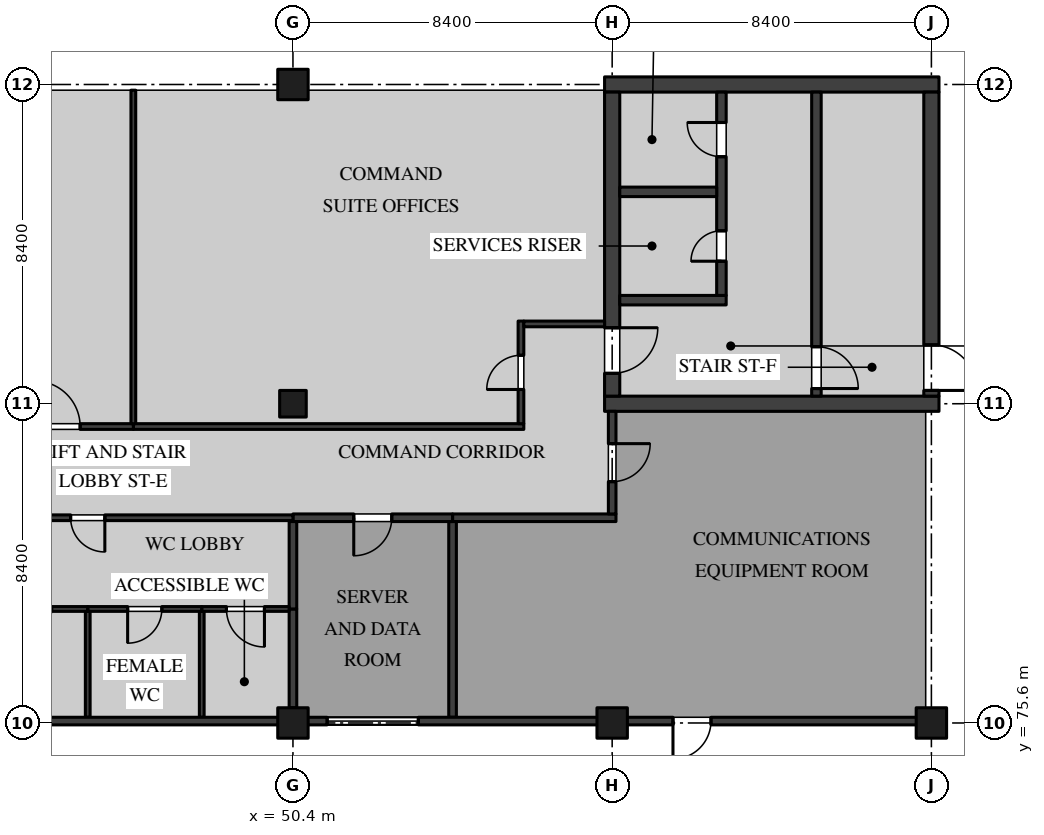
"""IFC4 building model, lengths in metres.
Left out: names, types, materials, properties, quantities, classifications, styles, units other than length and angle.
Written with IfcOpenShell. Run it as: python <this file> out.ifc"""

import sys

from ifc_helpers import new_model, si_unit, direction, frame, frame_2d, origin, origin_2d, place, context, subcontext, project, spatial, rectangle, extrude, element, fill, save


model = new_model("IFC4")
c1 = context("Model", 3, precision=1e-05, world=origin(), true_north=direction((0.0, 1.0)))
c2 = subcontext(c1, "Body", "Model", "MODEL_VIEW")
j1 = project(units=[si_unit("LENGTHUNIT", "METRE"), si_unit("PLANEANGLEUNIT", "RADIAN")], contexts=[c1])
p1 = place(None, origin())
s1 = spatial("IfcSite", under=j1, at=p1, CompositionType="ELEMENT")
p2 = place(p1, origin())
s2 = spatial("IfcBuilding", under=s1, at=p2, CompositionType="ELEMENT")
p3 = place(p2, origin())
s3 = spatial("IfcBuildingStorey", under=s2, at=p3, CompositionType="ELEMENT", Elevation=0.0)
p4 = place(p3, frame((50.4, 75.6, 0.0), z_axis=(0.0, 0.0, 1.0), x_axis=(1.0, 0.0, 0.0)))
e1 = element("IfcColumn", 1, at=p4, inside=s3, PredefinedType="COLUMN", context=c2, shape_type="SweptSolid", body=[
    extrude(rectangle(XDim=0.8, YDim=0.8, at=origin_2d()), origin(), (0.0, 0.0, 1.0), 5.05),
])
p5 = place(p3, frame((50.4, 84.0, 0.0), z_axis=(0.0, 0.0, 1.0), x_axis=(1.0, 0.0, 0.0)))
e2 = element("IfcColumn", 2, at=p5, inside=s3, PredefinedType="COLUMN", context=c2, shape_type="SweptSolid", body=[
    extrude(rectangle(XDim=0.7, YDim=0.7, at=origin_2d()), origin(), (0.0, 0.0, 1.0), 5.05),
])
for number, where, z_axis, x_axis in (
    (3, (50.4, 92.4, 0.0), (0.0, 0.0, 1.0), (1.0, 0.0, 0.0)),
    (4, (58.8, 75.6, 0.0), (0.0, 0.0, 1.0), (1.0, 0.0, 0.0)),
    (5, (67.2, 75.6, 0.0), (0.0, 0.0, 1.0), (1.0, 0.0, 0.0)),
):
    element("IfcColumn", number, at=place(p3, frame(where, z_axis=z_axis, x_axis=x_axis)), inside=s3, PredefinedType="COLUMN", context=c2, shape_type="SweptSolid", body=[
        extrude(rectangle(XDim=0.8, YDim=0.8, at=origin_2d()), origin(), (0.0, 0.0, 1.0), 5.05),
    ])
for number, where, z_axis, x_axis in (
    (6, (58.6, 84.0, 0.0), (0.0, 0.0, 1.0), (1.0, 0.0, 0.0)),
    (7, (58.6, 92.4, 0.0), (0.0, 0.0, 1.0), (1.0, 0.0, 0.0)),
):
    element("IfcWall", number, at=place(p3, frame(where, z_axis=z_axis, x_axis=x_axis)), inside=s3, PredefinedType="SHEAR", context=c2, shape_type="SweptSolid", body=[
        extrude(rectangle(XDim=8.8, YDim=0.4, at=frame_2d((4.4, 0.0))), origin(), (0.0, 0.0, 1.0), 5.05),
    ])
p6 = place(p3, frame((58.8, 84.2, 0.0), z_axis=(0.0, 0.0, 1.0), x_axis=(0.0, 1.0, 0.0)))
e8 = element("IfcWall", 8, at=p6, inside=s3, PredefinedType="SHEAR", context=c2, shape_type="SweptSolid", body=[
    extrude(rectangle(XDim=8.0, YDim=0.4, at=frame_2d((4.0, 0.0))), origin(), (0.0, 0.0, 1.0), 5.05),
])
p7 = place(p6, frame((0.6, 0.0, 0.0)))
e9 = element("IfcOpeningElement", 9, at=p7, cuts=e8, PredefinedType="OPENING", context=c2, shape_type="SweptSolid", body=[
    extrude(rectangle(XDim=1.2, YDim=2.1, at=frame_2d((0.6, 1.05))), frame((0.0, 0.21, 0.0), z_axis=(0.0, -1.0, 0.0), x_axis=(1.0, 0.0, 0.0)), (0.0, 0.0, 1.0), 0.42),
])
p8 = place(p3, frame((67.2, 84.2, 0.0), z_axis=(0.0, 0.0, 1.0), x_axis=(0.0, 1.0, 0.0)))
e10 = element("IfcWall", 10, at=p8, inside=s3, PredefinedType="SHEAR", context=c2, shape_type="SweptSolid", body=[
    extrude(rectangle(XDim=8.0, YDim=0.4, at=frame_2d((4.0, 0.0))), origin(), (0.0, 0.0, 1.0), 5.05),
])
p9 = place(p8, frame((0.15, 0.0, 0.0)))
e11 = element("IfcOpeningElement", 11, at=p9, cuts=e10, PredefinedType="OPENING", context=c2, shape_type="SweptSolid", body=[
    extrude(rectangle(XDim=1.2, YDim=2.1, at=frame_2d((0.6, 1.05))), frame((0.0, 0.21, 0.0), z_axis=(0.0, -1.0, 0.0), x_axis=(1.0, 0.0, 0.0)), (0.0, 0.0, 1.0), 0.42),
])
p10 = place(p3, frame((64.175, 84.2, 0.0), z_axis=(0.0, 0.0, 1.0), x_axis=(0.0, 1.0, 0.0)))
e12 = element("IfcWall", 12, at=p10, inside=s3, PredefinedType="SOLIDWALL", context=c2, shape_type="SweptSolid", body=[
    extrude(rectangle(XDim=8.0, YDim=0.25, at=frame_2d((4.0, 0.0))), origin(), (0.0, 0.0, 1.0), 5.05),
])
p11 = place(p10, frame((0.2, 0.0, 0.0)))
e13 = element("IfcOpeningElement", 13, at=p11, cuts=e12, PredefinedType="OPENING", context=c2, shape_type="SweptSolid", body=[
    extrude(rectangle(XDim=1.1, YDim=2.1, at=frame_2d((0.55, 1.05))), frame((0.0, 0.135, 0.0), z_axis=(0.0, -1.0, 0.0), x_axis=(1.0, 0.0, 0.0)), (0.0, 0.0, 1.0), 0.27),
])
p12 = place(p3, frame((61.8, 86.725, 0.0), z_axis=(0.0, 0.0, 1.0), x_axis=(-1.0, 0.0, 0.0)))
e14 = element("IfcWall", 14, at=p12, inside=s3, PredefinedType="SOLIDWALL", context=c2, shape_type="SweptSolid", body=[
    extrude(rectangle(XDim=2.8, YDim=0.25, at=frame_2d((1.4, 0.0))), origin(), (0.0, 0.0, 1.0), 5.05),
])
p13 = place(p3, frame((61.675, 86.85, 0.0), z_axis=(0.0, 0.0, 1.0), x_axis=(0.0, 1.0, 0.0)))
e15 = element("IfcWall", 15, at=p13, inside=s3, PredefinedType="SOLIDWALL", context=c2, shape_type="SweptSolid", body=[
    extrude(rectangle(XDim=5.35, YDim=0.25, at=frame_2d((2.675, 0.0))), origin(), (0.0, 0.0, 1.0), 5.05),
])
p14 = place(p13, frame((3.65, 0.0, 0.0)))
e16 = element("IfcOpeningElement", 16, at=p14, cuts=e15, PredefinedType="OPENING", context=c2, shape_type="SweptSolid", body=[
    extrude(rectangle(XDim=0.9, YDim=2.1, at=frame_2d((0.45, 1.05))), frame((0.0, 0.135, 0.0), z_axis=(0.0, -1.0, 0.0), x_axis=(1.0, 0.0, 0.0)), (0.0, 0.0, 1.0), 0.27),
])
p15 = place(p13, frame((0.9, 0.0, 0.0)))
e17 = element("IfcOpeningElement", 17, at=p15, cuts=e15, PredefinedType="OPENING", context=c2, shape_type="SweptSolid", body=[
    extrude(rectangle(XDim=0.8, YDim=2.1, at=frame_2d((0.4, 1.05))), frame((0.0, 0.135, 0.0), z_axis=(0.0, -1.0, 0.0), x_axis=(1.0, 0.0, 0.0)), (0.0, 0.0, 1.0), 0.27),
])
p16 = place(p3, frame((61.55, 89.575, 0.0), z_axis=(0.0, 0.0, 1.0), x_axis=(-1.0, 0.0, 0.0)))
e18 = element("IfcWall", 18, at=p16, inside=s3, PredefinedType="SOLIDWALL", context=c2, shape_type="SweptSolid", body=[
    extrude(rectangle(XDim=2.55, YDim=0.25, at=frame_2d((1.275, 0.0))), origin(), (0.0, 0.0, 1.0), 5.05),
])
p17 = place(p3, frame((54.6, 81.0, 0.0), z_axis=(0.0, 0.0, 1.0), x_axis=(1.0, 0.0, 0.0)))
e19 = element("IfcWall", 19, at=p17, inside=s3, PredefinedType="PARTITIONING", context=c2, shape_type="SweptSolid", body=[
    extrude(rectangle(XDim=4.3, YDim=0.2, at=frame_2d((2.15, 0.0))), origin(), (0.0, 0.0, 1.0), 5.05),
])
p18 = place(p3, frame((58.8, 81.1, 0.0), z_axis=(0.0, 0.0, 1.0), x_axis=(0.0, 1.0, 0.0)))
e20 = element("IfcWall", 20, at=p18, inside=s3, PredefinedType="PARTITIONING", context=c2, shape_type="SweptSolid", body=[
    extrude(rectangle(XDim=2.7, YDim=0.2, at=frame_2d((1.35, 0.0))), origin(), (0.0, 0.0, 1.0), 5.05),
])
p19 = place(p18, frame((0.85, 0.0, 0.0)))
e21 = element("IfcOpeningElement", 21, at=p19, cuts=e20, PredefinedType="OPENING", context=c2, shape_type="SweptSolid", body=[
    extrude(rectangle(XDim=1.0, YDim=2.1, at=frame_2d((0.5, 1.05))), frame((0.0, 0.11, 0.0), z_axis=(0.0, -1.0, 0.0), x_axis=(1.0, 0.0, 0.0)), (0.0, 0.0, 1.0), 0.22),
])
p20 = place(p3, frame((54.6, 75.75, 0.0), z_axis=(0.0, 0.0, 1.0), x_axis=(0.0, 1.0, 0.0)))
e22 = element("IfcWall", 22, at=p20, inside=s3, PredefinedType="PARTITIONING", context=c2, shape_type="SweptSolid", body=[
    extrude(rectangle(XDim=5.15, YDim=0.2, at=frame_2d((2.575, 0.0))), origin(), (0.0, 0.0, 1.0), 5.05),
])
p21 = place(p3, frame((46.2, 83.4, 0.0), z_axis=(0.0, 0.0, 1.0), x_axis=(1.0, 0.0, 0.0)))
e23 = element("IfcWall", 23, at=p21, inside=s3, PredefinedType="PARTITIONING", context=c2, shape_type="SweptSolid", body=[
    extrude(rectangle(XDim=10.275, YDim=0.15, at=frame_2d((5.138, 0.0))), origin(), (0.0, 0.0, 1.0), 5.05),
])
p22 = place(p3, frame((56.4, 83.475, 0.0), z_axis=(0.0, 0.0, 1.0), x_axis=(0.0, 1.0, 0.0)))
e24 = element("IfcWall", 24, at=p22, inside=s3, PredefinedType="PARTITIONING", context=c2, shape_type="SweptSolid", body=[
    extrude(rectangle(XDim=2.7, YDim=0.15, at=frame_2d((1.35, 0.0))), origin(), (0.0, 0.0, 1.0), 5.05),
])
p23 = place(p22, frame((0.9, 0.0, 0.0)))
e25 = element("IfcOpeningElement", 25, at=p23, cuts=e24, PredefinedType="OPENING", context=c2, shape_type="SweptSolid", body=[
    extrude(rectangle(XDim=0.9, YDim=2.1, at=frame_2d((0.45, 1.05))), frame((0.0, 0.085, 0.0), z_axis=(0.0, -1.0, 0.0), x_axis=(1.0, 0.0, 0.0)), (0.0, 0.0, 1.0), 0.17),
])
p24 = place(p3, frame((56.475, 86.1, 0.0), z_axis=(0.0, 0.0, 1.0), x_axis=(1.0, 0.0, 0.0)))
e26 = element("IfcWall", 26, at=p24, inside=s3, PredefinedType="PARTITIONING", context=c2, shape_type="SweptSolid", body=[
    extrude(rectangle(XDim=2.125, YDim=0.15, at=frame_2d((1.062, 0.0))), origin(), (0.0, 0.0, 1.0), 5.05),
])
p25 = place(p3, frame((42.2, 83.4, 0.0), z_axis=(0.0, 0.0, 1.0), x_axis=(1.0, 0.0, 0.0)))
e27 = element("IfcWall", 27, at=p25, inside=s3, PredefinedType="PARTITIONING", context=c2, shape_type="SweptSolid", body=[
    extrude(rectangle(XDim=4.0, YDim=0.15, at=frame_2d((2.0, 0.0))), origin(), (0.0, 0.0, 1.0), 5.05),
])
p26 = place(p25, frame((1.4, 0.0, 0.0)))
e28 = element("IfcOpeningElement", 28, at=p26, cuts=e27, PredefinedType="OPENING", context=c2, shape_type="SweptSolid", body=[
    extrude(rectangle(XDim=1.2, YDim=2.4, at=frame_2d((0.6, 1.2))), frame((0.0, 0.085, 0.0), z_axis=(0.0, -1.0, 0.0), x_axis=(1.0, 0.0, 0.0)), (0.0, 0.0, 1.0), 0.17),
])
p27 = place(p3, frame((50.4, 81.0, 0.0), z_axis=(0.0, 0.0, 1.0), x_axis=(1.0, 0.0, 0.0)))
e29 = element("IfcWall", 29, at=p27, inside=s3, PredefinedType="PARTITIONING", context=c2, shape_type="SweptSolid", body=[
    extrude(rectangle(XDim=4.2, YDim=0.2, at=frame_2d((2.1, 0.0))), origin(), (0.0, 0.0, 1.0), 5.05),
])
p28 = place(p27, frame((1.6, 0.0, 0.0)))
e30 = element("IfcOpeningElement", 30, at=p28, cuts=e29, PredefinedType="OPENING", context=c2, shape_type="SweptSolid", body=[
    extrude(rectangle(XDim=1.0, YDim=2.1, at=frame_2d((0.5, 1.05))), frame((0.0, 0.11, 0.0), z_axis=(0.0, -1.0, 0.0), x_axis=(1.0, 0.0, 0.0)), (0.0, 0.0, 1.0), 0.22),
])
p29 = place(p3, frame((42.2, 81.0, 0.0), z_axis=(0.0, 0.0, 1.0), x_axis=(1.0, 0.0, 0.0)))
e31 = element("IfcWall", 31, at=p29, inside=s3, PredefinedType="PARTITIONING", context=c2, shape_type="SweptSolid", body=[
    extrude(rectangle(XDim=8.2, YDim=0.15, at=frame_2d((4.1, 0.0))), origin(), (0.0, 0.0, 1.0), 5.05),
])
p30 = place(p29, frame((2.35, 0.0, 0.0)))
e32 = element("IfcOpeningElement", 32, at=p30, cuts=e31, PredefinedType="OPENING", context=c2, shape_type="SweptSolid", body=[
    extrude(rectangle(XDim=0.9, YDim=2.1, at=frame_2d((0.45, 1.05))), frame((0.0, 0.085, 0.0), z_axis=(0.0, -1.0, 0.0), x_axis=(1.0, 0.0, 0.0)), (0.0, 0.0, 1.0), 0.17),
])
p31 = place(p3, frame((46.2, 83.475, 0.0), z_axis=(0.0, 0.0, 1.0), x_axis=(0.0, 1.0, 0.0)))
e33 = element("IfcWall", 33, at=p31, inside=s3, PredefinedType="PARTITIONING", context=c2, shape_type="SweptSolid", body=[
    extrude(rectangle(XDim=8.775, YDim=0.125, at=frame_2d((4.387, 0.0))), origin(), (0.0, 0.0, 1.0), 5.05),
])
p32 = place(p3, frame((50.4, 76.0, 0.0), z_axis=(0.0, 0.0, 1.0), x_axis=(0.0, 1.0, 0.0)))
e34 = element("IfcWall", 34, at=p32, inside=s3, PredefinedType="PARTITIONING", context=c2, shape_type="SweptSolid", body=[
    extrude(rectangle(XDim=2.6, YDim=0.2, at=frame_2d((1.3, 0.0))), origin(), (0.0, 0.0, 1.0), 5.05),
])
p33 = place(p3, frame((50.4, 78.6, 0.0), z_axis=(0.0, 0.0, 1.0), x_axis=(0.0, 1.0, 0.0)))
e35 = element("IfcWall", 35, at=p33, inside=s3, PredefinedType="PARTITIONING", context=c2, shape_type="SweptSolid", body=[
    extrude(rectangle(XDim=2.3, YDim=0.2, at=frame_2d((1.15, 0.0))), origin(), (0.0, 0.0, 1.0), 5.05),
])
p34 = place(p3, frame((48.0, 75.75, 0.0), z_axis=(0.0, 0.0, 1.0), x_axis=(0.0, 1.0, 0.0)))
e36 = element("IfcWall", 36, at=p34, inside=s3, PredefinedType="PARTITIONING", context=c2, shape_type="SweptSolid", body=[
    extrude(rectangle(XDim=2.787, YDim=0.125, at=frame_2d((1.394, 0.0))), origin(), (0.0, 0.0, 1.0), 5.05),
])
p35 = place(p3, frame((48.0, 78.6, 0.0), z_axis=(0.0, 0.0, 1.0), x_axis=(1.0, 0.0, 0.0)))
e37 = element("IfcWall", 37, at=p35, inside=s3, PredefinedType="PARTITIONING", context=c2, shape_type="SweptSolid", body=[
    extrude(rectangle(XDim=2.3, YDim=0.125, at=frame_2d((1.15, 0.0))), origin(), (0.0, 0.0, 1.0), 5.05),
])
p36 = place(p35, frame((0.65, 0.0, 0.0)))
e38 = element("IfcOpeningElement", 38, at=p36, cuts=e37, PredefinedType="OPENING", context=c2, shape_type="SweptSolid", body=[
    extrude(rectangle(XDim=1.0, YDim=2.1, at=frame_2d((0.5, 1.05))), frame((0.0, 0.073, 0.0), z_axis=(0.0, -1.0, 0.0), x_axis=(1.0, 0.0, 0.0)), (0.0, 0.0, 1.0), 0.145),
])
p37 = place(p3, frame((45.0, 78.6, 0.0), z_axis=(0.0, 0.0, 1.0), x_axis=(1.0, 0.0, 0.0)))
e39 = element("IfcWall", 39, at=p37, inside=s3, PredefinedType="PARTITIONING", context=c2, shape_type="SweptSolid", body=[
    extrude(rectangle(XDim=3.0, YDim=0.125, at=frame_2d((1.5, 0.0))), origin(), (0.0, 0.0, 1.0), 5.05),
])
p38 = place(p37, frame((1.05, 0.0, 0.0)))
e40 = element("IfcOpeningElement", 40, at=p38, cuts=e39, PredefinedType="OPENING", context=c2, shape_type="SweptSolid", body=[
    extrude(rectangle(XDim=0.9, YDim=2.1, at=frame_2d((0.45, 1.05))), frame((0.0, 0.073, 0.0), z_axis=(0.0, -1.0, 0.0), x_axis=(1.0, 0.0, 0.0)), (0.0, 0.0, 1.0), 0.145),
])
p39 = place(p3, frame((45.0, 75.75, 0.0), z_axis=(0.0, 0.0, 1.0), x_axis=(0.0, 1.0, 0.0)))
e41 = element("IfcWall", 41, at=p39, inside=s3, PredefinedType="PARTITIONING", context=c2, shape_type="SweptSolid", body=[
    extrude(rectangle(XDim=2.787, YDim=0.125, at=frame_2d((1.394, 0.0))), origin(), (0.0, 0.0, 1.0), 5.05),
])
p40 = place(p3, frame((42.2, 78.6, 0.0), z_axis=(0.0, 0.0, 1.0), x_axis=(1.0, 0.0, 0.0)))
e42 = element("IfcWall", 42, at=p40, inside=s3, PredefinedType="PARTITIONING", context=c2, shape_type="SweptSolid", body=[
    extrude(rectangle(XDim=2.8, YDim=0.125, at=frame_2d((1.4, 0.0))), origin(), (0.0, 0.0, 1.0), 5.05),
])
p41 = place(p40, frame((0.95, 0.0, 0.0)))
e43 = element("IfcOpeningElement", 43, at=p41, cuts=e42, PredefinedType="OPENING", context=c2, shape_type="SweptSolid", body=[
    extrude(rectangle(XDim=0.9, YDim=2.1, at=frame_2d((0.45, 1.05))), frame((0.0, 0.073, 0.0), z_axis=(0.0, -1.0, 0.0), x_axis=(1.0, 0.0, 0.0)), (0.0, 0.0, 1.0), 0.145),
])
p42 = place(p3, frame((42.2, 75.65, 0.0), z_axis=(0.0, 0.0, 1.0), x_axis=(1.0, 0.0, 0.0)))
e44 = element("IfcWall", 44, at=p42, inside=s3, PredefinedType="SOLIDWALL", context=c2, shape_type="SweptSolid", body=[
    extrude(rectangle(XDim=7.82, YDim=0.2, at=frame_2d((3.91, 0.0))), origin(), (0.0, 0.0, 1.0), 5.05),
])
p43 = place(p3, frame((50.78, 75.65, 0.0), z_axis=(0.0, 0.0, 1.0), x_axis=(1.0, 0.0, 0.0)))
e45 = element("IfcWall", 45, at=p43, inside=s3, PredefinedType="SOLIDWALL", context=c2, shape_type="SweptSolid", body=[
    extrude(rectangle(XDim=7.64, YDim=0.2, at=frame_2d((3.82, 0.0))), origin(), (0.0, 0.0, 1.0), 5.05),
])
p44 = place(p43, frame((0.52, 0.0, 0.9)))
e46 = element("IfcOpeningElement", 46, at=p44, cuts=e45, PredefinedType="OPENING", context=c2, shape_type="SweptSolid", body=[
    extrude(rectangle(XDim=2.4, YDim=2.85, at=frame_2d((1.2, 1.425))), frame((0.0, 0.11, 0.0), z_axis=(0.0, -1.0, 0.0), x_axis=(1.0, 0.0, 0.0)), (0.0, 0.0, 1.0), 0.22),
])
p45 = place(p3, frame((59.18, 75.65, 0.0), z_axis=(0.0, 0.0, 1.0), x_axis=(1.0, 0.0, 0.0)))
e47 = element("IfcWall", 47, at=p45, inside=s3, PredefinedType="SOLIDWALL", context=c2, shape_type="SweptSolid", body=[
    extrude(rectangle(XDim=7.64, YDim=0.2, at=frame_2d((3.82, 0.0))), origin(), (0.0, 0.0, 1.0), 5.05),
])
p46 = place(p45, frame((1.22, 0.0, 0.0)))
e48 = element("IfcOpeningElement", 48, at=p46, cuts=e47, PredefinedType="OPENING", context=c2, shape_type="SweptSolid", body=[
    extrude(rectangle(XDim=1.0, YDim=2.4, at=frame_2d((0.5, 1.2))), frame((0.0, 0.11, 0.0), z_axis=(0.0, -1.0, 0.0), x_axis=(1.0, 0.0, 0.0)), (0.0, 0.0, 1.0), 0.22),
])
p47 = place(p14, origin())
e49 = element("IfcDoor", 49, at=p47, inside=s3, OperationType="SINGLE_SWING_LEFT", PredefinedType="DOOR", context=c2, shape_type="SweptSolid", body=[
    extrude(rectangle(XDim=0.9, YDim=2.1, at=frame_2d((0.45, 1.05))), frame((0.0, 0.035, 0.0), z_axis=(0.0, -1.0, 0.0), x_axis=(1.0, 0.0, 0.0)), (0.0, 0.0, 1.0), 0.07),
])
fill(e16, e49)
p48 = place(p7, frame((1.2, 0.0, 0.0), z_axis=(0.0, 0.0, 1.0), x_axis=(-1.0, 0.0, 0.0)))
e50 = element("IfcDoor", 50, at=p48, inside=s3, OperationType="SINGLE_SWING_RIGHT", PredefinedType="DOOR", context=c2, shape_type="SweptSolid", body=[
    extrude(rectangle(XDim=1.2, YDim=2.1, at=frame_2d((0.6, 1.05))), frame((0.0, 0.035, 0.0), z_axis=(0.0, -1.0, 0.0), x_axis=(1.0, 0.0, 0.0)), (0.0, 0.0, 1.0), 0.07),
])
fill(e9, e50)
p49 = place(p15, origin())
e51 = element("IfcDoor", 51, at=p49, inside=s3, OperationType="SINGLE_SWING_RIGHT", PredefinedType="DOOR", context=c2, shape_type="SweptSolid", body=[
    extrude(rectangle(XDim=0.8, YDim=2.1, at=frame_2d((0.4, 1.05))), frame((0.0, 0.035, 0.0), z_axis=(0.0, -1.0, 0.0), x_axis=(1.0, 0.0, 0.0)), (0.0, 0.0, 1.0), 0.07),
])
fill(e17, e51)
p50 = place(p11, frame((1.1, 0.0, 0.0), z_axis=(0.0, 0.0, 1.0), x_axis=(-1.0, 0.0, 0.0)))
e52 = element("IfcDoor", 52, at=p50, inside=s3, OperationType="SINGLE_SWING_LEFT", PredefinedType="DOOR", context=c2, shape_type="SweptSolid", body=[
    extrude(rectangle(XDim=1.1, YDim=2.1, at=frame_2d((0.55, 1.05))), frame((0.0, 0.035, 0.0), z_axis=(0.0, -1.0, 0.0), x_axis=(1.0, 0.0, 0.0)), (0.0, 0.0, 1.0), 0.07),
])
fill(e13, e52)
p51 = place(p9, frame((1.2, 0.0, 0.0), z_axis=(0.0, 0.0, 1.0), x_axis=(-1.0, 0.0, 0.0)))
e53 = element("IfcDoor", 53, at=p51, inside=s3, OperationType="SINGLE_SWING_LEFT", PredefinedType="DOOR", context=c2, shape_type="SweptSolid", body=[
    extrude(rectangle(XDim=1.2, YDim=2.1, at=frame_2d((0.6, 1.05))), frame((0.0, 0.035, 0.0), z_axis=(0.0, -1.0, 0.0), x_axis=(1.0, 0.0, 0.0)), (0.0, 0.0, 1.0), 0.07),
])
fill(e11, e53)
p52 = place(p19, frame((1.0, 0.0, 0.0), z_axis=(0.0, 0.0, 1.0), x_axis=(-1.0, 0.0, 0.0)))
e54 = element("IfcDoor", 54, at=p52, inside=s3, OperationType="SINGLE_SWING_RIGHT", PredefinedType="DOOR", context=c2, shape_type="SweptSolid", body=[
    extrude(rectangle(XDim=1.0, YDim=2.1, at=frame_2d((0.5, 1.05))), frame((0.0, 0.03, 0.0), z_axis=(0.0, -1.0, 0.0), x_axis=(1.0, 0.0, 0.0)), (0.0, 0.0, 1.0), 0.06),
])
fill(e21, e54)
p53 = place(p23, origin())
e55 = element("IfcDoor", 55, at=p53, inside=s3, OperationType="SINGLE_SWING_RIGHT", PredefinedType="DOOR", context=c2, shape_type="SweptSolid", body=[
    extrude(rectangle(XDim=0.9, YDim=2.1, at=frame_2d((0.45, 1.05))), frame((0.0, 0.025, 0.0), z_axis=(0.0, -1.0, 0.0), x_axis=(1.0, 0.0, 0.0)), (0.0, 0.0, 1.0), 0.05),
])
fill(e25, e55)
p54 = place(p26, origin())
e56 = element("IfcDoor", 56, at=p54, inside=s3, OperationType="SINGLE_SWING_RIGHT", PredefinedType="DOOR", context=c2, shape_type="SweptSolid", body=[
    extrude(rectangle(XDim=1.2, YDim=2.4, at=frame_2d((0.6, 1.2))), frame((0.0, 0.025, 0.0), z_axis=(0.0, -1.0, 0.0), x_axis=(1.0, 0.0, 0.0)), (0.0, 0.0, 1.0), 0.05),
])
fill(e28, e56)
p55 = place(p28, frame((1.0, 0.0, 0.0), z_axis=(0.0, 0.0, 1.0), x_axis=(-1.0, 0.0, 0.0)))
e57 = element("IfcDoor", 57, at=p55, inside=s3, OperationType="SINGLE_SWING_LEFT", PredefinedType="DOOR", context=c2, shape_type="SweptSolid", body=[
    extrude(rectangle(XDim=1.0, YDim=2.1, at=frame_2d((0.5, 1.05))), frame((0.0, 0.03, 0.0), z_axis=(0.0, -1.0, 0.0), x_axis=(1.0, 0.0, 0.0)), (0.0, 0.0, 1.0), 0.06),
])
fill(e30, e57)
p56 = place(p36, frame((1.0, 0.0, 0.0), z_axis=(0.0, 0.0, 1.0), x_axis=(-1.0, 0.0, 0.0)))
e58 = element("IfcDoor", 58, at=p56, inside=s3, OperationType="SINGLE_SWING_RIGHT", PredefinedType="DOOR", context=c2, shape_type="SweptSolid", body=[
    extrude(rectangle(XDim=1.0, YDim=2.1, at=frame_2d((0.5, 1.05))), frame((0.0, 0.02, 0.0), z_axis=(0.0, -1.0, 0.0), x_axis=(1.0, 0.0, 0.0)), (0.0, 0.0, 1.0), 0.04),
])
fill(e38, e58)
p57 = place(p38, frame((0.9, 0.0, 0.0), z_axis=(0.0, 0.0, 1.0), x_axis=(-1.0, 0.0, 0.0)))
e59 = element("IfcDoor", 59, at=p57, inside=s3, OperationType="SINGLE_SWING_LEFT", PredefinedType="DOOR", context=c2, shape_type="SweptSolid", body=[
    extrude(rectangle(XDim=0.9, YDim=2.1, at=frame_2d((0.45, 1.05))), frame((0.0, 0.02, 0.0), z_axis=(0.0, -1.0, 0.0), x_axis=(1.0, 0.0, 0.0)), (0.0, 0.0, 1.0), 0.04),
])
fill(e40, e59)
p58 = place(p30, frame((0.9, 0.0, 0.0), z_axis=(0.0, 0.0, 1.0), x_axis=(-1.0, 0.0, 0.0)))
e60 = element("IfcDoor", 60, at=p58, inside=s3, OperationType="SINGLE_SWING_RIGHT", PredefinedType="DOOR", context=c2, shape_type="SweptSolid", body=[
    extrude(rectangle(XDim=0.9, YDim=2.1, at=frame_2d((0.45, 1.05))), frame((0.0, 0.025, 0.0), z_axis=(0.0, -1.0, 0.0), x_axis=(1.0, 0.0, 0.0)), (0.0, 0.0, 1.0), 0.05),
])
fill(e32, e60)
p59 = place(p44, origin())
e61 = element("IfcWindow", 61, at=p59, inside=s3, PartitioningType="SINGLE_PANEL", PredefinedType="WINDOW", context=c2, shape_type="SweptSolid", body=[
    extrude(rectangle(XDim=2.4, YDim=2.85, at=frame_2d((1.2, 1.425))), frame((0.0, 0.05, 0.0), z_axis=(0.0, -1.0, 0.0), x_axis=(1.0, 0.0, 0.0)), (0.0, 0.0, 1.0), 0.1),
])
fill(e46, e61)
p60 = place(p46, frame((1.0, 0.0, 0.0), z_axis=(0.0, 0.0, 1.0), x_axis=(-1.0, 0.0, 0.0)))
e62 = element("IfcDoor", 62, at=p60, inside=s3, OperationType="SINGLE_SWING_LEFT", PredefinedType="DOOR", context=c2, shape_type="SweptSolid", body=[
    extrude(rectangle(XDim=1.0, YDim=2.4, at=frame_2d((0.5, 1.2))), frame((0.0, 0.025, 0.0), z_axis=(0.0, -1.0, 0.0), x_axis=(1.0, 0.0, 0.0)), (0.0, 0.0, 1.0), 0.05),
])
fill(e48, e62)
save(model, sys.argv[1])
